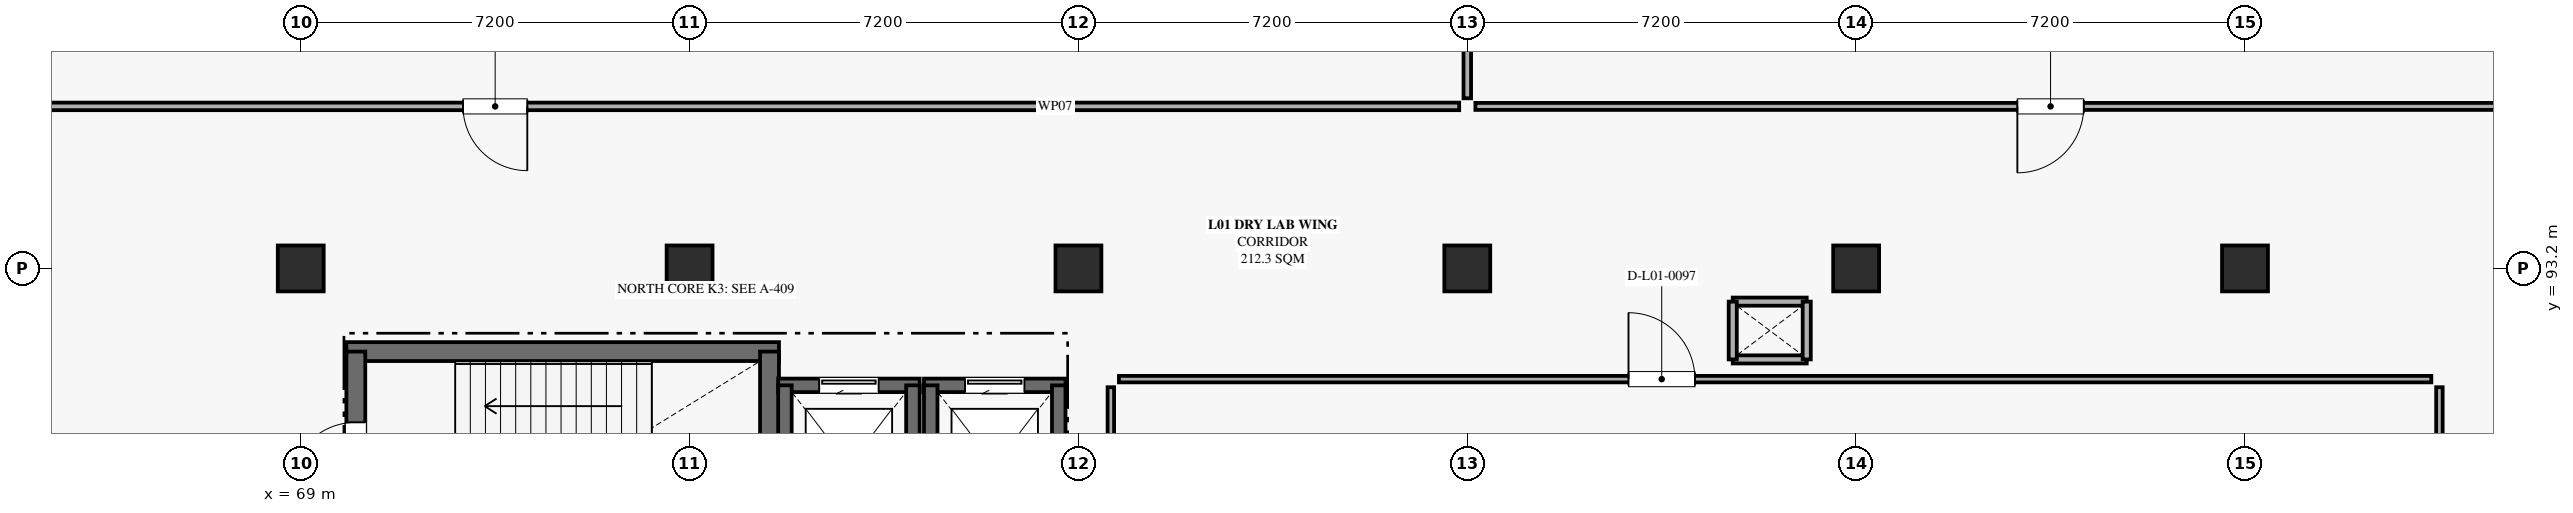
"""IFC4 building model, lengths in metres.
Left out: names, types, materials, properties, quantities, classifications, styles, units other than length and angle.
Written with IfcOpenShell. Run it as: python <this file> out.ifc"""

import sys

from ifc_helpers import new_model, si_unit, direction, frame, frame_2d, origin, origin_2d, place, context, subcontext, project, spatial, rectangle, extrude, element, fill, save


model = new_model("IFC4")
c1 = context("Model", 3, precision=1e-05, world=origin(), true_north=direction((0.0, 1.0)))
c2 = subcontext(c1, "Body", "Model", "MODEL_VIEW")
j1 = project(units=[si_unit("LENGTHUNIT", "METRE"), si_unit("PLANEANGLEUNIT", "RADIAN")], contexts=[c1])
p1 = place(None, origin())
s1 = spatial("IfcSite", under=j1, at=p1, CompositionType="ELEMENT")
p2 = place(p1, origin())
s2 = spatial("IfcBuilding", under=s1, at=p2, CompositionType="ELEMENT")
p3 = place(p2, frame((0.0, 0.0, 5.4)))
s3 = spatial("IfcBuildingStorey", under=s2, at=p3, CompositionType="ELEMENT", Elevation=5.4)
for number, where, z_axis, x_axis in (
    (1, (69.0, 93.2, 0.0), (0.0, 0.0, 1.0), (1.0, 0.0, 0.0)),
    (2, (76.2, 93.2, 0.0), (0.0, 0.0, 1.0), (1.0, 0.0, 0.0)),
    (3, (83.4, 93.2, 0.0), (0.0, 0.0, 1.0), (1.0, 0.0, 0.0)),
    (4, (90.6, 93.2, 0.0), (0.0, 0.0, 1.0), (1.0, 0.0, 0.0)),
    (5, (97.8, 93.2, 0.0), (0.0, 0.0, 1.0), (1.0, 0.0, 0.0)),
    (6, (105.0, 93.2, 0.0), (0.0, 0.0, 1.0), (1.0, 0.0, 0.0)),
):
    element("IfcColumn", number, at=place(p3, frame(where, z_axis=z_axis, x_axis=x_axis)), inside=s3, PredefinedType="COLUMN", context=c2, shape_type="SweptSolid", body=[
        extrude(rectangle(XDim=0.85, YDim=0.85, at=origin_2d()), origin(), (0.0, 0.0, 1.0), 5.04),
    ])
p4 = place(p3, frame((69.845, 91.66, 0.0), z_axis=(0.0, 0.0, 1.0), x_axis=(1.0, 0.0, 0.0)))
e7 = element("IfcWall", 7, at=p4, inside=s3, PredefinedType="SHEAR", context=c2, shape_type="SweptSolid", body=[
    extrude(rectangle(XDim=8.01, YDim=0.35, at=frame_2d((4.005, 0.0))), origin(), (0.0, 0.0, 1.0), 4.77),
])
p5 = place(p3, frame((70.02, 87.82, 0.0), z_axis=(0.0, 0.0, 1.0), x_axis=(0.0, 1.0, 0.0)))
e8 = element("IfcWall", 8, at=p5, inside=s3, PredefinedType="SHEAR", context=c2, shape_type="SweptSolid", body=[
    extrude(rectangle(XDim=3.84, YDim=0.35, at=frame_2d((1.92, 0.0))), origin(), (0.0, 0.0, 1.0), 4.77),
])
p6 = place(p5, frame((1.31, 0.0, 0.0)))
e9 = element("IfcOpeningElement", 9, at=p6, cuts=e8, PredefinedType="OPENING", context=c2, shape_type="SweptSolid", body=[
    extrude(rectangle(XDim=1.22, YDim=2.12, at=frame_2d((0.61, 1.06))), frame((0.0, 0.185, 0.0), z_axis=(0.0, -1.0, 0.0), x_axis=(1.0, 0.0, 0.0)), (0.0, 0.0, 1.0), 0.37),
])
p7 = place(p3, frame((77.68, 91.66, 0.0), z_axis=(0.0, 0.0, 1.0), x_axis=(0.0, -1.0, 0.0)))
e10 = element("IfcWall", 10, at=p7, inside=s3, PredefinedType="SHEAR", context=c2, shape_type="SweptSolid", body=[
    extrude(rectangle(XDim=3.84, YDim=0.35, at=frame_2d((1.92, 0.0))), origin(), (0.0, 0.0, 1.0), 4.77),
])
for number, where, z_axis, x_axis in (
    (11, (96.885, 91.515, 0.0), (0.0, 0.0, 1.0), (-1.0, 0.0, 0.0)),
    (12, (95.515, 92.585, 0.0), (0.0, 0.0, 1.0), (1.0, 0.0, 0.0)),
):
    element("IfcWall", number, at=place(p3, frame(where, z_axis=z_axis, x_axis=x_axis)), inside=s3, PredefinedType="PARTITIONING", context=c2, shape_type="SweptSolid", body=[
        extrude(rectangle(XDim=1.37, YDim=0.15, at=frame_2d((0.685, 0.0))), origin(), (0.0, 0.0, 1.0), 3.52),
    ])
for number, where, z_axis, x_axis in (
    (13, (95.515, 91.515, 0.0), (0.0, 0.0, 1.0), (0.0, 1.0, 0.0)),
    (14, (96.885, 92.585, 0.0), (0.0, 0.0, 1.0), (0.0, -1.0, 0.0)),
):
    element("IfcWall", number, at=place(p3, frame(where, z_axis=z_axis, x_axis=x_axis)), inside=s3, PredefinedType="PARTITIONING", context=c2, shape_type="SweptSolid", body=[
        extrude(rectangle(XDim=1.07, YDim=0.15, at=frame_2d((0.535, 0.0))), origin(), (0.0, 0.0, 1.0), 3.52),
    ])
p8 = place(p3, frame((77.84, 91.035, 0.0), z_axis=(0.0, 0.0, 1.0), x_axis=(1.0, 0.0, 0.0)))
e15 = element("IfcWall", 15, at=p8, inside=s3, PredefinedType="SHEAR", context=c2, shape_type="SweptSolid", body=[
    extrude(rectangle(XDim=2.62, YDim=0.25, at=frame_2d((1.31, 0.0))), origin(), (0.0, 0.0, 1.0), 4.77),
])
p9 = place(p8, frame((0.76, 0.0, 0.0)))
e16 = element("IfcOpeningElement", 16, at=p9, cuts=e15, PredefinedType="OPENING", context=c2, shape_type="SweptSolid", body=[
    extrude(rectangle(XDim=1.1, YDim=2.2, at=frame_2d((0.55, 1.1))), frame((0.0, 0.135, 0.0), z_axis=(0.0, -1.0, 0.0), x_axis=(1.0, 0.0, 0.0)), (0.0, 0.0, 1.0), 0.27),
])
for number, where, z_axis, x_axis in (
    (17, (77.965, 88.065, 0.0), (0.0, 0.0, 1.0), (0.0, 1.0, 0.0)),
    (18, (80.335, 91.035, 0.0), (0.0, 0.0, 1.0), (0.0, -1.0, 0.0)),
):
    element("IfcWall", number, at=place(p3, frame(where, z_axis=z_axis, x_axis=x_axis)), inside=s3, PredefinedType="SHEAR", context=c2, shape_type="SweptSolid", body=[
        extrude(rectangle(XDim=2.97, YDim=0.25, at=frame_2d((1.485, 0.0))), origin(), (0.0, 0.0, 1.0), 4.77),
    ])
p10 = place(p3, frame((80.54, 91.035, 0.0), z_axis=(0.0, 0.0, 1.0), x_axis=(1.0, 0.0, 0.0)))
e19 = element("IfcWall", 19, at=p10, inside=s3, PredefinedType="SHEAR", context=c2, shape_type="SweptSolid", body=[
    extrude(rectangle(XDim=2.62, YDim=0.25, at=frame_2d((1.31, 0.0))), origin(), (0.0, 0.0, 1.0), 4.77),
])
p11 = place(p10, frame((0.76, 0.0, 0.0)))
e20 = element("IfcOpeningElement", 20, at=p11, cuts=e19, PredefinedType="OPENING", context=c2, shape_type="SweptSolid", body=[
    extrude(rectangle(XDim=1.1, YDim=2.2, at=frame_2d((0.55, 1.1))), frame((0.0, 0.135, 0.0), z_axis=(0.0, -1.0, 0.0), x_axis=(1.0, 0.0, 0.0)), (0.0, 0.0, 1.0), 0.27),
])
for number, where, z_axis, x_axis in (
    (21, (80.665, 88.065, 0.0), (0.0, 0.0, 1.0), (0.0, 1.0, 0.0)),
    (22, (83.035, 91.035, 0.0), (0.0, 0.0, 1.0), (0.0, -1.0, 0.0)),
):
    element("IfcWall", number, at=place(p3, frame(where, z_axis=z_axis, x_axis=x_axis)), inside=s3, PredefinedType="SHEAR", context=c2, shape_type="SweptSolid", body=[
        extrude(rectangle(XDim=2.97, YDim=0.25, at=frame_2d((1.485, 0.0))), origin(), (0.0, 0.0, 1.0), 4.77),
    ])
p12 = place(p3, frame((90.45, 96.2, 0.0), z_axis=(0.0, 0.0, 1.0), x_axis=(-1.0, 0.0, 0.0)))
e23 = element("IfcWall", 23, at=p12, inside=s3, PredefinedType="PARTITIONING", context=c2, shape_type="SweptSolid", body=[
    extrude(rectangle(XDim=28.3, YDim=0.14, at=frame_2d((14.15, 0.0))), origin(), (0.0, 0.0, 1.0), 3.52),
])
p13 = place(p12, frame((17.255, 0.0, 0.0)))
e24 = element("IfcOpeningElement", 24, at=p13, cuts=e23, PredefinedType="OPENING", context=c2, shape_type="SweptSolid", body=[
    extrude(rectangle(XDim=1.19, YDim=2.22, at=frame_2d((0.595, 1.11))), frame((0.0, 0.08, 0.0), z_axis=(0.0, -1.0, 0.0), x_axis=(1.0, 0.0, 0.0)), (0.0, 0.0, 1.0), 0.16),
])
p14 = place(p3, frame((90.6, 114.2, 0.0), z_axis=(0.0, 0.0, 1.0), x_axis=(0.0, -1.0, 0.0)))
e25 = element("IfcWall", 25, at=p14, inside=s3, PredefinedType="PARTITIONING", context=c2, shape_type="SweptSolid", body=[
    extrude(rectangle(XDim=17.85, YDim=0.14, at=frame_2d((8.925, 0.0))), origin(), (0.0, 0.0, 1.0), 3.52),
])
p15 = place(p3, frame((111.85, 96.2, 0.0), z_axis=(0.0, 0.0, 1.0), x_axis=(-1.0, 0.0, 0.0)))
e26 = element("IfcWall", 26, at=p15, inside=s3, PredefinedType="PARTITIONING", context=c2, shape_type="SweptSolid", body=[
    extrude(rectangle(XDim=21.1, YDim=0.13, at=frame_2d((10.55, 0.0))), origin(), (0.0, 0.0, 1.0), 3.52),
])
p16 = place(p15, frame((9.835, 0.0, 0.0)))
e27 = element("IfcOpeningElement", 27, at=p16, cuts=e26, PredefinedType="OPENING", context=c2, shape_type="SweptSolid", body=[
    extrude(rectangle(XDim=1.23, YDim=2.05, at=frame_2d((0.615, 1.025))), frame((0.0, 0.075, 0.0), z_axis=(0.0, -1.0, 0.0), x_axis=(1.0, 0.0, 0.0)), (0.0, 0.0, 1.0), 0.15),
])
p17 = place(p3, frame((84.15, 91.15, 0.0), z_axis=(0.0, 0.0, 1.0), x_axis=(1.0, 0.0, 0.0)))
e28 = element("IfcWall", 28, at=p17, inside=s3, PredefinedType="PARTITIONING", context=c2, shape_type="SweptSolid", body=[
    extrude(rectangle(XDim=24.3, YDim=0.12, at=frame_2d((12.15, 0.0))), origin(), (0.0, 0.0, 1.0), 3.52),
])
p18 = place(p17, frame((9.435, 0.0, 0.0)))
e29 = element("IfcOpeningElement", 29, at=p18, cuts=e28, PredefinedType="OPENING", context=c2, shape_type="SweptSolid", body=[
    extrude(rectangle(XDim=1.23, YDim=2.1, at=frame_2d((0.615, 1.05))), frame((0.0, 0.07, 0.0), z_axis=(0.0, -1.0, 0.0), x_axis=(1.0, 0.0, 0.0)), (0.0, 0.0, 1.0), 0.14),
])
for number, where, z_axis, x_axis in (
    (30, (84.0, 86.35, 0.0), (0.0, 0.0, 1.0), (0.0, 1.0, 0.0)),
    (31, (108.6, 91.0, 0.0), (0.0, 0.0, 1.0), (0.0, -1.0, 0.0)),
):
    element("IfcWall", number, at=place(p3, frame(where, z_axis=z_axis, x_axis=x_axis)), inside=s3, PredefinedType="PARTITIONING", context=c2, shape_type="SweptSolid", body=[
        extrude(rectangle(XDim=4.65, YDim=0.12, at=frame_2d((2.325, 0.0))), origin(), (0.0, 0.0, 1.0), 3.52),
    ])
p19 = place(p6, origin())
e32 = element("IfcDoor", 32, at=p19, inside=s3, OperationType="SINGLE_SWING_LEFT", PredefinedType="DOOR", context=c2, shape_type="SweptSolid", body=[
    extrude(rectangle(XDim=1.22, YDim=2.12, at=frame_2d((0.61, 1.06))), frame((0.0, 0.025, 0.0), z_axis=(0.0, -1.0, 0.0), x_axis=(1.0, 0.0, 0.0)), (0.0, 0.0, 1.0), 0.05),
])
fill(e9, e32)
p20 = place(p9, origin())
e33 = element("IfcDoor", 33, at=p20, inside=s3, OperationType="SLIDING_TO_LEFT", PredefinedType="DOOR", context=c2, shape_type="SweptSolid", body=[
    extrude(rectangle(XDim=1.1, YDim=2.2, at=frame_2d((0.55, 1.1))), frame((0.0, 0.025, 0.0), z_axis=(0.0, -1.0, 0.0), x_axis=(1.0, 0.0, 0.0)), (0.0, 0.0, 1.0), 0.05),
])
fill(e16, e33)
p21 = place(p11, origin())
e34 = element("IfcDoor", 34, at=p21, inside=s3, OperationType="SLIDING_TO_LEFT", PredefinedType="DOOR", context=c2, shape_type="SweptSolid", body=[
    extrude(rectangle(XDim=1.1, YDim=2.2, at=frame_2d((0.55, 1.1))), frame((0.0, 0.025, 0.0), z_axis=(0.0, -1.0, 0.0), x_axis=(1.0, 0.0, 0.0)), (0.0, 0.0, 1.0), 0.05),
])
fill(e20, e34)
p22 = place(p13, origin())
e35 = element("IfcDoor", 35, at=p22, inside=s3, OperationType="SINGLE_SWING_LEFT", PredefinedType="DOOR", context=c2, shape_type="SweptSolid", body=[
    extrude(rectangle(XDim=1.19, YDim=2.22, at=frame_2d((0.595, 1.11))), frame((0.0, 0.025, 0.0), z_axis=(0.0, -1.0, 0.0), x_axis=(1.0, 0.0, 0.0)), (0.0, 0.0, 1.0), 0.05),
])
fill(e24, e35)
p23 = place(p16, origin())
e36 = element("IfcDoor", 36, at=p23, inside=s3, OperationType="SINGLE_SWING_RIGHT", PredefinedType="DOOR", context=c2, shape_type="SweptSolid", body=[
    extrude(rectangle(XDim=1.23, YDim=2.05, at=frame_2d((0.615, 1.025))), frame((0.0, 0.025, 0.0), z_axis=(0.0, -1.0, 0.0), x_axis=(1.0, 0.0, 0.0)), (0.0, 0.0, 1.0), 0.05),
])
fill(e27, e36)
p24 = place(p18, origin())
e37 = element("IfcDoor", 37, at=p24, inside=s3, OperationType="SINGLE_SWING_LEFT", PredefinedType="DOOR", context=c2, shape_type="SweptSolid", body=[
    extrude(rectangle(XDim=1.23, YDim=2.1, at=frame_2d((0.615, 1.05))), frame((0.0, 0.025, 0.0), z_axis=(0.0, -1.0, 0.0), x_axis=(1.0, 0.0, 0.0)), (0.0, 0.0, 1.0), 0.05),
])
fill(e29, e37)
save(model, sys.argv[1])
